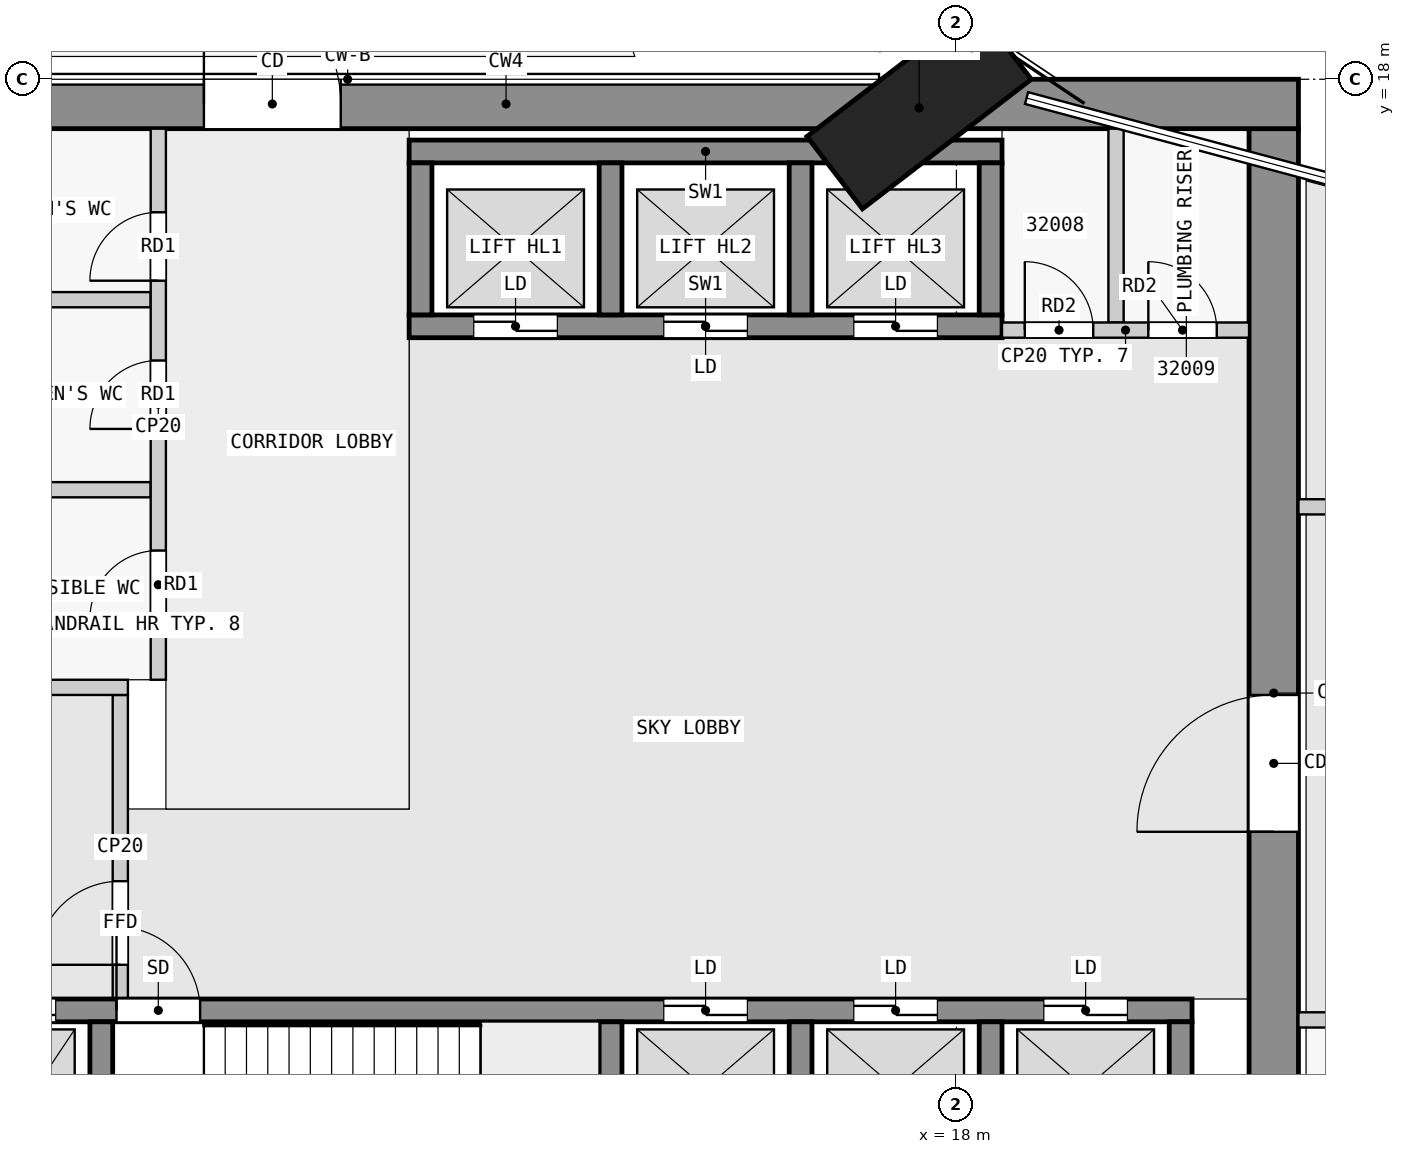
"""IFC4 building model, lengths in metres.
Left out: names, types, materials, properties, quantities, classifications, styles, units other than length and angle.
Written with IfcOpenShell. Run it as: python <this file> out.ifc"""

import sys

from ifc_helpers import new_model, si_unit, direction, frame, frame_2d, origin, origin_2d, place, context, subcontext, project, spatial, rectangle, extrude, element, fill, save


model = new_model("IFC4")
c1 = context("Model", 3, precision=1e-05, world=origin(), true_north=direction((0.0, 1.0)))
c2 = subcontext(c1, "Body", "Model", "MODEL_VIEW")
j1 = project(units=[si_unit("LENGTHUNIT", "METRE"), si_unit("PLANEANGLEUNIT", "RADIAN")], contexts=[c1])
p1 = place(None, origin())
s1 = spatial("IfcSite", under=j1, at=p1, CompositionType="ELEMENT")
p2 = place(p1, origin())
s2 = spatial("IfcBuilding", under=s1, at=p2, CompositionType="ELEMENT")
p3 = place(p2, frame((0.0, 0.0, 123.8)))
s3 = spatial("IfcBuildingStorey", under=s2, at=p3, CompositionType="ELEMENT", Elevation=123.8)
p4 = place(p3, frame((17.51, 17.624, 0.0), z_axis=(0.0, 0.0, 1.0), x_axis=(-0.608810846443, 0.793315418515, 0.0)))
e1 = element("IfcColumn", 1, at=p4, inside=s3, PredefinedType="COLUMN", context=c2, shape_type="SweptSolid", body=[
    extrude(rectangle(XDim=1.2, YDim=2.8, at=origin_2d()), origin(), (0.0, 0.0, 1.0), 4.8),
])
p5 = place(p3, frame((1.65, 17.675, 0.0), z_axis=(0.0, 0.0, 1.0), x_axis=(1.0, 0.0, 0.0)))
e2 = element("IfcWall", 2, at=p5, inside=s3, PredefinedType="SHEAR", context=c2, shape_type="SweptSolid", body=[
    extrude(rectangle(XDim=20.85, YDim=0.65, at=frame_2d((10.425, 0.0))), origin(), (0.0, 0.0, 1.0), 4.5),
])
p6 = place(p5, frame((6.45, 0.0, 0.0)))
e3 = element("IfcOpeningElement", 3, at=p6, cuts=e2, PredefinedType="OPENING", context=c2, shape_type="SweptSolid", body=[
    extrude(rectangle(XDim=1.8, YDim=2.1, at=frame_2d((0.9, 1.05))), frame((0.0, 0.335, 0.0), z_axis=(0.0, -1.0, 0.0), x_axis=(1.0, 0.0, 0.0)), (0.0, 0.0, 1.0), 0.67),
])
p7 = place(p3, frame((22.175, 2.5, 0.0), z_axis=(0.0, 0.0, 1.0), x_axis=(0.0, 1.0, 0.0)))
e4 = element("IfcWall", 4, at=p7, inside=s3, PredefinedType="SHEAR", context=c2, shape_type="SweptSolid", body=[
    extrude(rectangle(XDim=14.85, YDim=0.65, at=frame_2d((7.425, 0.0))), origin(), (0.0, 0.0, 1.0), 4.5),
])
p8 = place(p7, frame((5.6, 0.0, 0.0)))
e5 = element("IfcOpeningElement", 5, at=p8, cuts=e4, PredefinedType="OPENING", context=c2, shape_type="SweptSolid", body=[
    extrude(rectangle(XDim=1.8, YDim=2.1, at=frame_2d((0.9, 1.05))), frame((0.0, 0.335, 0.0), z_axis=(0.0, -1.0, 0.0), x_axis=(1.0, 0.0, 0.0)), (0.0, 0.0, 1.0), 0.67),
])
for number, where, z_axis, x_axis in (
    (6, (6.75, 2.8, 0.0), (0.0, 0.0, 1.0), (0.0, 1.0, 0.0)),
    (7, (13.45, 2.8, 0.0), (0.0, 0.0, 1.0), (0.0, 1.0, 0.0)),
    (8, (15.95, 2.8, 0.0), (0.0, 0.0, 1.0), (0.0, 1.0, 0.0)),
    (9, (18.45, 2.8, 0.0), (0.0, 0.0, 1.0), (0.0, 1.0, 0.0)),
    (10, (20.95, 2.8, 0.0), (0.0, 0.0, 1.0), (0.0, 1.0, 0.0)),
):
    element("IfcWall", number, at=place(p3, frame(where, z_axis=z_axis, x_axis=x_axis)), inside=s3, PredefinedType="SHEAR", context=c2, shape_type="SweptSolid", body=[
        extrude(rectangle(XDim=2.8, YDim=0.3, at=frame_2d((1.4, 0.0))), origin(), (0.0, 0.0, 1.0), 4.5),
    ])
p9 = place(p3, frame((2.3, 5.75, 0.0), z_axis=(0.0, 0.0, 1.0), x_axis=(1.0, 0.0, 0.0)))
e11 = element("IfcWall", 11, at=p9, inside=s3, PredefinedType="SHEAR", context=c2, shape_type="SweptSolid", body=[
    extrude(rectangle(XDim=18.8, YDim=0.3, at=frame_2d((9.4, 0.0))), origin(), (0.0, 0.0, 1.0), 4.5),
])
p10 = place(p9, frame((4.65, 0.0, 0.0)))
e12 = element("IfcOpeningElement", 12, at=p10, cuts=e11, PredefinedType="OPENING", context=c2, shape_type="SweptSolid", body=[
    extrude(rectangle(XDim=1.1, YDim=2.1, at=frame_2d((0.55, 1.05))), frame((0.0, 0.16, 0.0), z_axis=(0.0, -1.0, 0.0), x_axis=(1.0, 0.0, 0.0)), (0.0, 0.0, 1.0), 0.32),
])
p11 = place(p9, frame((0.45, 0.0, 0.0)))
e13 = element("IfcOpeningElement", 13, at=p11, cuts=e11, PredefinedType="OPENING", context=c2, shape_type="SweptSolid", body=[
    extrude(rectangle(XDim=1.1, YDim=2.1, at=frame_2d((0.55, 1.05))), frame((0.0, 0.16, 0.0), z_axis=(0.0, -1.0, 0.0), x_axis=(1.0, 0.0, 0.0)), (0.0, 0.0, 1.0), 0.32),
])
p12 = place(p9, frame((2.75, 0.0, 0.0)))
e14 = element("IfcOpeningElement", 14, at=p12, cuts=e11, PredefinedType="OPENING", context=c2, shape_type="SweptSolid", body=[
    extrude(rectangle(XDim=1.1, YDim=2.1, at=frame_2d((0.55, 1.05))), frame((0.0, 0.16, 0.0), z_axis=(0.0, -1.0, 0.0), x_axis=(1.0, 0.0, 0.0)), (0.0, 0.0, 1.0), 0.32),
])
p13 = place(p9, frame((11.85, 0.0, 0.0)))
e15 = element("IfcOpeningElement", 15, at=p13, cuts=e11, PredefinedType="OPENING", context=c2, shape_type="SweptSolid", body=[
    extrude(rectangle(XDim=1.1, YDim=2.1, at=frame_2d((0.55, 1.05))), frame((0.0, 0.16, 0.0), z_axis=(0.0, -1.0, 0.0), x_axis=(1.0, 0.0, 0.0)), (0.0, 0.0, 1.0), 0.32),
])
p14 = place(p9, frame((14.35, 0.0, 0.0)))
e16 = element("IfcOpeningElement", 16, at=p14, cuts=e11, PredefinedType="OPENING", context=c2, shape_type="SweptSolid", body=[
    extrude(rectangle(XDim=1.1, YDim=2.1, at=frame_2d((0.55, 1.05))), frame((0.0, 0.16, 0.0), z_axis=(0.0, -1.0, 0.0), x_axis=(1.0, 0.0, 0.0)), (0.0, 0.0, 1.0), 0.32),
])
p15 = place(p9, frame((16.85, 0.0, 0.0)))
e17 = element("IfcOpeningElement", 17, at=p15, cuts=e11, PredefinedType="OPENING", context=c2, shape_type="SweptSolid", body=[
    extrude(rectangle(XDim=1.1, YDim=2.1, at=frame_2d((0.55, 1.05))), frame((0.0, 0.16, 0.0), z_axis=(0.0, -1.0, 0.0), x_axis=(1.0, 0.0, 0.0)), (0.0, 0.0, 1.0), 0.32),
])
p16 = place(p3, frame((10.8, 17.05, 0.0), z_axis=(0.0, 0.0, 1.0), x_axis=(1.0, 0.0, 0.0)))
e18 = element("IfcWall", 18, at=p16, inside=s3, PredefinedType="SHEAR", context=c2, shape_type="SweptSolid", body=[
    extrude(rectangle(XDim=7.8, YDim=0.3, at=frame_2d((3.9, 0.0))), origin(), (0.0, 0.0, 1.0), 4.5),
])
p17 = place(p3, frame((10.8, 14.75, 0.0), z_axis=(0.0, 0.0, 1.0), x_axis=(1.0, 0.0, 0.0)))
e19 = element("IfcWall", 19, at=p17, inside=s3, PredefinedType="SHEAR", context=c2, shape_type="SweptSolid", body=[
    extrude(rectangle(XDim=7.8, YDim=0.3, at=frame_2d((3.9, 0.0))), origin(), (0.0, 0.0, 1.0), 4.5),
])
p18 = place(p17, frame((0.85, 0.0, 0.0)))
e20 = element("IfcOpeningElement", 20, at=p18, cuts=e19, PredefinedType="OPENING", context=c2, shape_type="SweptSolid", body=[
    extrude(rectangle(XDim=1.1, YDim=2.1, at=frame_2d((0.55, 1.05))), frame((0.0, 0.16, 0.0), z_axis=(0.0, -1.0, 0.0), x_axis=(1.0, 0.0, 0.0)), (0.0, 0.0, 1.0), 0.32),
])
p19 = place(p17, frame((3.35, 0.0, 0.0)))
e21 = element("IfcOpeningElement", 21, at=p19, cuts=e19, PredefinedType="OPENING", context=c2, shape_type="SweptSolid", body=[
    extrude(rectangle(XDim=1.1, YDim=2.1, at=frame_2d((0.55, 1.05))), frame((0.0, 0.16, 0.0), z_axis=(0.0, -1.0, 0.0), x_axis=(1.0, 0.0, 0.0)), (0.0, 0.0, 1.0), 0.32),
])
p20 = place(p17, frame((5.85, 0.0, 0.0)))
e22 = element("IfcOpeningElement", 22, at=p20, cuts=e19, PredefinedType="OPENING", context=c2, shape_type="SweptSolid", body=[
    extrude(rectangle(XDim=1.1, YDim=2.1, at=frame_2d((0.55, 1.05))), frame((0.0, 0.16, 0.0), z_axis=(0.0, -1.0, 0.0), x_axis=(1.0, 0.0, 0.0)), (0.0, 0.0, 1.0), 0.32),
])
for number, where, z_axis, x_axis in (
    (23, (10.95, 14.9, 0.0), (0.0, 0.0, 1.0), (0.0, 1.0, 0.0)),
    (24, (13.45, 14.9, 0.0), (0.0, 0.0, 1.0), (0.0, 1.0, 0.0)),
    (25, (15.95, 14.9, 0.0), (0.0, 0.0, 1.0), (0.0, 1.0, 0.0)),
    (26, (18.45, 14.9, 0.0), (0.0, 0.0, 1.0), (0.0, 1.0, 0.0)),
):
    element("IfcWall", number, at=place(p3, frame(where, z_axis=z_axis, x_axis=x_axis)), inside=s3, PredefinedType="SHEAR", context=c2, shape_type="SweptSolid", body=[
        extrude(rectangle(XDim=2.0, YDim=0.3, at=frame_2d((1.0, 0.0))), origin(), (0.0, 0.0, 1.0), 4.5),
    ])
p21 = place(p3, frame((7.0, 5.9, 0.0), z_axis=(0.0, 0.0, 1.0), x_axis=(0.0, 1.0, 0.0)))
e27 = element("IfcWall", 27, at=p21, inside=s3, PredefinedType="PARTITIONING", context=c2, shape_type="SweptSolid", body=[
    extrude(rectangle(XDim=4.0, YDim=0.2, at=frame_2d((2.0, 0.0))), origin(), (0.0, 0.0, 1.0), 4.5),
])
p22 = place(p21, frame((0.45, 0.0, 0.0)))
e28 = element("IfcOpeningElement", 28, at=p22, cuts=e27, PredefinedType="OPENING", context=c2, shape_type="SweptSolid", body=[
    extrude(rectangle(XDim=1.1, YDim=2.1, at=frame_2d((0.55, 1.05))), frame((0.0, 0.11, 0.0), z_axis=(0.0, -1.0, 0.0), x_axis=(1.0, 0.0, 0.0)), (0.0, 0.0, 1.0), 0.22),
])
p23 = place(p3, frame((5.15, 10.0, 0.0), z_axis=(0.0, 0.0, 1.0), x_axis=(1.0, 0.0, 0.0)))
e29 = element("IfcWall", 29, at=p23, inside=s3, PredefinedType="PARTITIONING", context=c2, shape_type="SweptSolid", body=[
    extrude(rectangle(XDim=1.95, YDim=0.2, at=frame_2d((0.975, 0.0))), origin(), (0.0, 0.0, 1.0), 4.5),
])
p24 = place(p3, frame((7.5, 10.1, 0.0), z_axis=(0.0, 0.0, 1.0), x_axis=(0.0, 1.0, 0.0)))
e30 = element("IfcWall", 30, at=p24, inside=s3, PredefinedType="PARTITIONING", context=c2, shape_type="SweptSolid", body=[
    extrude(rectangle(XDim=7.25, YDim=0.2, at=frame_2d((3.625, 0.0))), origin(), (0.0, 0.0, 1.0), 4.5),
])
p25 = place(p24, frame((0.8, 0.0, 0.0)))
e31 = element("IfcOpeningElement", 31, at=p25, cuts=e30, PredefinedType="OPENING", context=c2, shape_type="SweptSolid", body=[
    extrude(rectangle(XDim=0.9, YDim=2.1, at=frame_2d((0.45, 1.05))), frame((0.0, 0.11, 0.0), z_axis=(0.0, -1.0, 0.0), x_axis=(1.0, 0.0, 0.0)), (0.0, 0.0, 1.0), 0.22),
])
p26 = place(p24, frame((3.3, 0.0, 0.0)))
e32 = element("IfcOpeningElement", 32, at=p26, cuts=e30, PredefinedType="OPENING", context=c2, shape_type="SweptSolid", body=[
    extrude(rectangle(XDim=0.9, YDim=2.1, at=frame_2d((0.45, 1.05))), frame((0.0, 0.11, 0.0), z_axis=(0.0, -1.0, 0.0), x_axis=(1.0, 0.0, 0.0)), (0.0, 0.0, 1.0), 0.22),
])
p27 = place(p24, frame((5.25, 0.0, 0.0)))
e33 = element("IfcOpeningElement", 33, at=p27, cuts=e30, PredefinedType="OPENING", context=c2, shape_type="SweptSolid", body=[
    extrude(rectangle(XDim=0.9, YDim=2.1, at=frame_2d((0.45, 1.05))), frame((0.0, 0.11, 0.0), z_axis=(0.0, -1.0, 0.0), x_axis=(1.0, 0.0, 0.0)), (0.0, 0.0, 1.0), 0.22),
])
for number, where, z_axis, x_axis in (
    (34, (5.15, 12.6, 0.0), (0.0, 0.0, 1.0), (1.0, 0.0, 0.0)),
    (35, (5.15, 15.1, 0.0), (0.0, 0.0, 1.0), (1.0, 0.0, 0.0)),
):
    element("IfcWall", number, at=place(p3, frame(where, z_axis=z_axis, x_axis=x_axis)), inside=s3, PredefinedType="PARTITIONING", context=c2, shape_type="SweptSolid", body=[
        extrude(rectangle(XDim=2.25, YDim=0.2, at=frame_2d((1.125, 0.0))), origin(), (0.0, 0.0, 1.0), 4.5),
    ])
p28 = place(p3, frame((18.6, 14.7, 0.0), z_axis=(0.0, 0.0, 1.0), x_axis=(1.0, 0.0, 0.0)))
e36 = element("IfcWall", 36, at=p28, inside=s3, PredefinedType="PARTITIONING", context=c2, shape_type="SweptSolid", body=[
    extrude(rectangle(XDim=3.25, YDim=0.2, at=frame_2d((1.625, 0.0))), origin(), (0.0, 0.0, 1.0), 4.5),
])
p29 = place(p28, frame((0.3, 0.0, 0.0)))
e37 = element("IfcOpeningElement", 37, at=p29, cuts=e36, PredefinedType="OPENING", context=c2, shape_type="SweptSolid", body=[
    extrude(rectangle(XDim=0.9, YDim=2.1, at=frame_2d((0.45, 1.05))), frame((0.0, 0.11, 0.0), z_axis=(0.0, -1.0, 0.0), x_axis=(1.0, 0.0, 0.0)), (0.0, 0.0, 1.0), 0.22),
])
p30 = place(p28, frame((1.925, 0.0, 0.0)))
e38 = element("IfcOpeningElement", 38, at=p30, cuts=e36, PredefinedType="OPENING", context=c2, shape_type="SweptSolid", body=[
    extrude(rectangle(XDim=0.9, YDim=2.1, at=frame_2d((0.45, 1.05))), frame((0.0, 0.11, 0.0), z_axis=(0.0, -1.0, 0.0), x_axis=(1.0, 0.0, 0.0)), (0.0, 0.0, 1.0), 0.22),
])
p31 = place(p3, frame((20.1, 14.8, 0.0), z_axis=(0.0, 0.0, 1.0), x_axis=(0.0, 1.0, 0.0)))
e39 = element("IfcWall", 39, at=p31, inside=s3, PredefinedType="PARTITIONING", context=c2, shape_type="SweptSolid", body=[
    extrude(rectangle(XDim=2.55, YDim=0.2, at=frame_2d((1.275, 0.0))), origin(), (0.0, 0.0, 1.0), 4.5),
])
p32 = place(p3, frame((22.5, 12.375, 0.0), z_axis=(0.0, 0.0, 1.0), x_axis=(1.0, 0.0, 0.0)))
e40 = element("IfcWall", 40, at=p32, inside=s3, PredefinedType="PARTITIONING", context=c2, shape_type="SweptSolid", body=[
    extrude(rectangle(XDim=9.0, YDim=0.2, at=frame_2d((4.5, 0.0))), origin(), (0.0, 0.0, 1.0), 4.5),
])
p33 = place(p32, frame((3.85, 0.0, 0.0)))
e41 = element("IfcOpeningElement", 41, at=p33, cuts=e40, PredefinedType="OPENING", context=c2, shape_type="SweptSolid", body=[
    extrude(rectangle(XDim=1.1, YDim=2.1, at=frame_2d((0.55, 1.05))), frame((0.0, 0.11, 0.0), z_axis=(0.0, -1.0, 0.0), x_axis=(1.0, 0.0, 0.0)), (0.0, 0.0, 1.0), 0.22),
])
p34 = place(p3, frame((31.5, 5.625, 0.0), z_axis=(0.0, 0.0, 1.0), x_axis=(-1.0, 0.0, 0.0)))
e42 = element("IfcWall", 42, at=p34, inside=s3, PredefinedType="PARTITIONING", context=c2, shape_type="SweptSolid", body=[
    extrude(rectangle(XDim=9.0, YDim=0.2, at=frame_2d((4.5, 0.0))), origin(), (0.0, 0.0, 1.0), 4.5),
])
p35 = place(p34, frame((3.6, 0.0, 0.0)))
e43 = element("IfcOpeningElement", 43, at=p35, cuts=e42, PredefinedType="OPENING", context=c2, shape_type="SweptSolid", body=[
    extrude(rectangle(XDim=1.8, YDim=2.1, at=frame_2d((0.9, 1.05))), frame((0.0, 0.11, 0.0), z_axis=(0.0, -1.0, 0.0), x_axis=(1.0, 0.0, 0.0)), (0.0, 0.0, 1.0), 0.22),
])
p36 = place(p22, origin())
e44 = element("IfcDoor", 44, at=p36, inside=s3, OperationType="SINGLE_SWING_LEFT", PredefinedType="DOOR", context=c2, shape_type="SweptSolid", body=[
    extrude(rectangle(XDim=1.1, YDim=2.1, at=frame_2d((0.55, 1.05))), frame((0.0, 0.025, 0.0), z_axis=(0.0, -1.0, 0.0), x_axis=(1.0, 0.0, 0.0)), (0.0, 0.0, 1.0), 0.05),
])
fill(e28, e44)
p37 = place(p10, origin())
e45 = element("IfcDoor", 45, at=p37, inside=s3, OperationType="SINGLE_SWING_LEFT", PredefinedType="DOOR", context=c2, shape_type="SweptSolid", body=[
    extrude(rectangle(XDim=1.1, YDim=2.1, at=frame_2d((0.55, 1.05))), frame((0.0, 0.025, 0.0), z_axis=(0.0, -1.0, 0.0), x_axis=(1.0, 0.0, 0.0)), (0.0, 0.0, 1.0), 0.05),
])
fill(e12, e45)
p38 = place(p12, origin())
e46 = element("IfcDoor", 46, at=p38, inside=s3, OperationType="DOUBLE_DOOR_SLIDING", PredefinedType="DOOR", context=c2, shape_type="SweptSolid", body=[
    extrude(rectangle(XDim=1.1, YDim=2.1, at=frame_2d((0.55, 1.05))), frame((0.0, 0.025, 0.0), z_axis=(0.0, -1.0, 0.0), x_axis=(1.0, 0.0, 0.0)), (0.0, 0.0, 1.0), 0.05),
])
fill(e14, e46)
p39 = place(p13, origin())
e47 = element("IfcDoor", 47, at=p39, inside=s3, OperationType="DOUBLE_DOOR_SLIDING", PredefinedType="DOOR", context=c2, shape_type="SweptSolid", body=[
    extrude(rectangle(XDim=1.1, YDim=2.1, at=frame_2d((0.55, 1.05))), frame((0.0, 0.025, 0.0), z_axis=(0.0, -1.0, 0.0), x_axis=(1.0, 0.0, 0.0)), (0.0, 0.0, 1.0), 0.05),
])
fill(e15, e47)
p40 = place(p14, origin())
e48 = element("IfcDoor", 48, at=p40, inside=s3, OperationType="DOUBLE_DOOR_SLIDING", PredefinedType="DOOR", context=c2, shape_type="SweptSolid", body=[
    extrude(rectangle(XDim=1.1, YDim=2.1, at=frame_2d((0.55, 1.05))), frame((0.0, 0.025, 0.0), z_axis=(0.0, -1.0, 0.0), x_axis=(1.0, 0.0, 0.0)), (0.0, 0.0, 1.0), 0.05),
])
fill(e16, e48)
p41 = place(p15, origin())
e49 = element("IfcDoor", 49, at=p41, inside=s3, OperationType="DOUBLE_DOOR_SLIDING", PredefinedType="DOOR", context=c2, shape_type="SweptSolid", body=[
    extrude(rectangle(XDim=1.1, YDim=2.1, at=frame_2d((0.55, 1.05))), frame((0.0, 0.025, 0.0), z_axis=(0.0, -1.0, 0.0), x_axis=(1.0, 0.0, 0.0)), (0.0, 0.0, 1.0), 0.05),
])
fill(e17, e49)
p42 = place(p18, origin())
e50 = element("IfcDoor", 50, at=p42, inside=s3, OperationType="DOUBLE_DOOR_SLIDING", PredefinedType="DOOR", context=c2, shape_type="SweptSolid", body=[
    extrude(rectangle(XDim=1.1, YDim=2.1, at=frame_2d((0.55, 1.05))), frame((0.0, 0.025, 0.0), z_axis=(0.0, -1.0, 0.0), x_axis=(1.0, 0.0, 0.0)), (0.0, 0.0, 1.0), 0.05),
])
fill(e20, e50)
p43 = place(p19, origin())
e51 = element("IfcDoor", 51, at=p43, inside=s3, OperationType="DOUBLE_DOOR_SLIDING", PredefinedType="DOOR", context=c2, shape_type="SweptSolid", body=[
    extrude(rectangle(XDim=1.1, YDim=2.1, at=frame_2d((0.55, 1.05))), frame((0.0, 0.025, 0.0), z_axis=(0.0, -1.0, 0.0), x_axis=(1.0, 0.0, 0.0)), (0.0, 0.0, 1.0), 0.05),
])
fill(e21, e51)
p44 = place(p20, origin())
e52 = element("IfcDoor", 52, at=p44, inside=s3, OperationType="DOUBLE_DOOR_SLIDING", PredefinedType="DOOR", context=c2, shape_type="SweptSolid", body=[
    extrude(rectangle(XDim=1.1, YDim=2.1, at=frame_2d((0.55, 1.05))), frame((0.0, 0.025, 0.0), z_axis=(0.0, -1.0, 0.0), x_axis=(1.0, 0.0, 0.0)), (0.0, 0.0, 1.0), 0.05),
])
fill(e22, e52)
p45 = place(p8, origin())
e53 = element("IfcDoor", 53, at=p45, inside=s3, OperationType="DOUBLE_DOOR_SINGLE_SWING", PredefinedType="DOOR", context=c2, shape_type="SweptSolid", body=[
    extrude(rectangle(XDim=1.8, YDim=2.1, at=frame_2d((0.9, 1.05))), frame((0.0, 0.025, 0.0), z_axis=(0.0, -1.0, 0.0), x_axis=(1.0, 0.0, 0.0)), (0.0, 0.0, 1.0), 0.05),
])
fill(e5, e53)
p46 = place(p6, origin())
e54 = element("IfcDoor", 54, at=p46, inside=s3, OperationType="DOUBLE_DOOR_SINGLE_SWING", PredefinedType="DOOR", context=c2, shape_type="SweptSolid", body=[
    extrude(rectangle(XDim=1.8, YDim=2.1, at=frame_2d((0.9, 1.05))), frame((0.0, 0.025, 0.0), z_axis=(0.0, -1.0, 0.0), x_axis=(1.0, 0.0, 0.0)), (0.0, 0.0, 1.0), 0.05),
])
fill(e3, e54)
p47 = place(p25, origin())
e55 = element("IfcDoor", 55, at=p47, inside=s3, OperationType="SINGLE_SWING_RIGHT", PredefinedType="DOOR", context=c2, shape_type="SweptSolid", body=[
    extrude(rectangle(XDim=0.9, YDim=2.1, at=frame_2d((0.45, 1.05))), frame((0.0, 0.025, 0.0), z_axis=(0.0, -1.0, 0.0), x_axis=(1.0, 0.0, 0.0)), (0.0, 0.0, 1.0), 0.05),
])
fill(e31, e55)
p48 = place(p26, origin())
e56 = element("IfcDoor", 56, at=p48, inside=s3, OperationType="SINGLE_SWING_RIGHT", PredefinedType="DOOR", context=c2, shape_type="SweptSolid", body=[
    extrude(rectangle(XDim=0.9, YDim=2.1, at=frame_2d((0.45, 1.05))), frame((0.0, 0.025, 0.0), z_axis=(0.0, -1.0, 0.0), x_axis=(1.0, 0.0, 0.0)), (0.0, 0.0, 1.0), 0.05),
])
fill(e32, e56)
p49 = place(p27, origin())
e57 = element("IfcDoor", 57, at=p49, inside=s3, OperationType="SINGLE_SWING_RIGHT", PredefinedType="DOOR", context=c2, shape_type="SweptSolid", body=[
    extrude(rectangle(XDim=0.9, YDim=2.1, at=frame_2d((0.45, 1.05))), frame((0.0, 0.025, 0.0), z_axis=(0.0, -1.0, 0.0), x_axis=(1.0, 0.0, 0.0)), (0.0, 0.0, 1.0), 0.05),
])
fill(e33, e57)
p50 = place(p29, origin())
e58 = element("IfcDoor", 58, at=p50, inside=s3, OperationType="SINGLE_SWING_LEFT", PredefinedType="DOOR", context=c2, shape_type="SweptSolid", body=[
    extrude(rectangle(XDim=0.9, YDim=2.1, at=frame_2d((0.45, 1.05))), frame((0.0, 0.025, 0.0), z_axis=(0.0, -1.0, 0.0), x_axis=(1.0, 0.0, 0.0)), (0.0, 0.0, 1.0), 0.05),
])
fill(e37, e58)
p51 = place(p30, origin())
e59 = element("IfcDoor", 59, at=p51, inside=s3, OperationType="SINGLE_SWING_LEFT", PredefinedType="DOOR", context=c2, shape_type="SweptSolid", body=[
    extrude(rectangle(XDim=0.9, YDim=2.1, at=frame_2d((0.45, 1.05))), frame((0.0, 0.025, 0.0), z_axis=(0.0, -1.0, 0.0), x_axis=(1.0, 0.0, 0.0)), (0.0, 0.0, 1.0), 0.05),
])
fill(e38, e59)
save(model, sys.argv[1])
